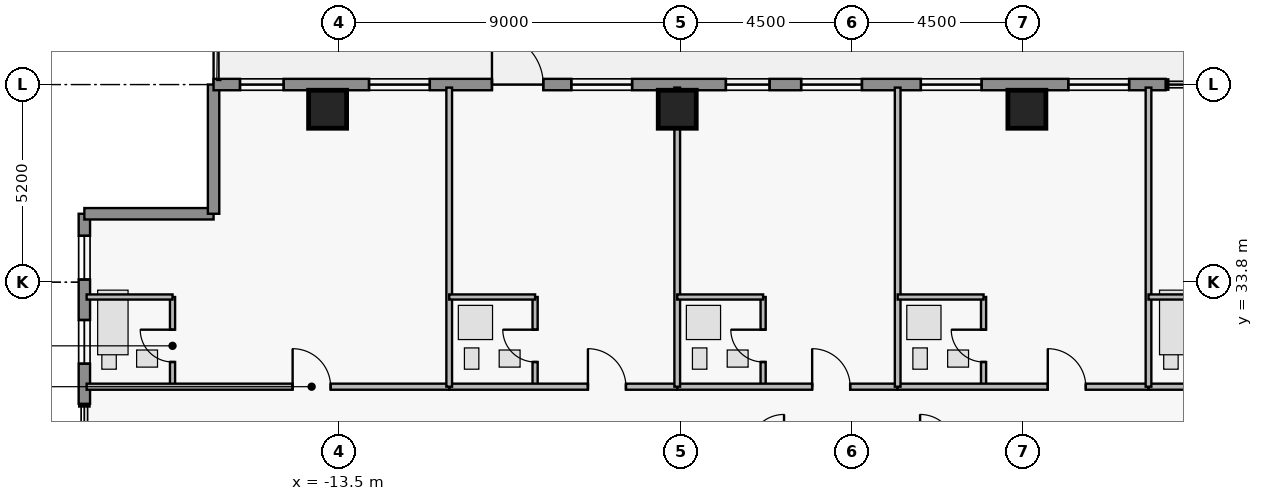
"""IFC4 building model, lengths in metres.
Left out: names, types, materials, properties, quantities, classifications, styles, units other than length and angle.
Written with IfcOpenShell. Run it as: python <this file> out.ifc"""

import sys

from ifc_helpers import new_model, si_unit, direction, frame, frame_2d, origin, origin_2d, place, context, subcontext, project, spatial, rectangle, extrude, element, fill, save


model = new_model("IFC4")
c1 = context("Model", 3, precision=1e-05, world=origin(), true_north=direction((0.0, 1.0)))
c2 = subcontext(c1, "Body", "Model", "MODEL_VIEW")
j1 = project(units=[si_unit("LENGTHUNIT", "METRE"), si_unit("PLANEANGLEUNIT", "RADIAN")], contexts=[c1])
p1 = place(None, origin())
s1 = spatial("IfcSite", under=j1, at=p1, CompositionType="ELEMENT")
p2 = place(p1, origin())
s2 = spatial("IfcBuilding", under=s1, at=p2, CompositionType="ELEMENT")
p3 = place(p2, frame((0.0, 0.0, 243.35)))
s3 = spatial("IfcBuildingStorey", under=s2, at=p3, CompositionType="ELEMENT", Elevation=243.35)
for number, where, z_axis, x_axis in (
    (1, (-13.8, 38.35, 0.0), (0.0, 0.0, 1.0), (1.0, 0.0, 0.0)),
    (2, (-4.6, 38.35, 0.0), (0.0, 0.0, 1.0), (1.0, 0.0, 0.0)),
    (3, (4.6, 38.35, 0.0), (0.0, 0.0, 1.0), (1.0, 0.0, 0.0)),
):
    element("IfcColumn", number, at=place(p3, frame(where, z_axis=z_axis, x_axis=x_axis)), inside=s3, PredefinedType="COLUMN", context=c2, shape_type="SweptSolid", body=[
        extrude(rectangle(XDim=1.0, YDim=1.0, at=origin_2d()), origin(), (0.0, 0.0, 1.0), 3.7),
    ])
p4 = place(p3, frame((-20.2, 30.6, 0.0), z_axis=(0.0, 0.0, 1.0), x_axis=(0.0, 1.0, 0.0)))
e4 = element("IfcWall", 4, at=p4, inside=s3, PredefinedType="STANDARD", context=c2, shape_type="SweptSolid", body=[
    extrude(rectangle(XDim=5.0, YDim=0.3, at=frame_2d((2.5, 0.0))), origin(), (0.0, 0.0, 1.0), 3.48),
])
p5 = place(p4, frame((1.055, 0.0, 0.95)))
e5 = element("IfcOpeningElement", 5, at=p5, cuts=e4, PredefinedType="OPENING", context=c2, shape_type="SweptSolid", body=[
    extrude(rectangle(XDim=1.15, YDim=1.55, at=frame_2d((0.575, 0.775))), frame((0.0, 0.16, 0.0), z_axis=(0.0, -1.0, 0.0), x_axis=(1.0, 0.0, 0.0)), (0.0, 0.0, 1.0), 0.32),
])
p6 = place(p4, frame((3.27, 0.0, 0.95)))
e6 = element("IfcOpeningElement", 6, at=p6, cuts=e4, PredefinedType="OPENING", context=c2, shape_type="SweptSolid", body=[
    extrude(rectangle(XDim=1.15, YDim=1.55, at=frame_2d((0.575, 0.775))), frame((0.0, 0.16, 0.0), z_axis=(0.0, -1.0, 0.0), x_axis=(1.0, 0.0, 0.0)), (0.0, 0.0, 1.0), 0.32),
])
for number, where, z_axis, x_axis in (
    (7, (-20.2, 35.6, 0.0), (0.0, 0.0, 1.0), (1.0, 0.0, 0.0)),
    (8, (-16.8, 35.6, 0.0), (0.0, 0.0, 1.0), (0.0, 1.0, 0.0)),
):
    element("IfcWall", number, at=place(p3, frame(where, z_axis=z_axis, x_axis=x_axis)), inside=s3, PredefinedType="STANDARD", context=c2, shape_type="SweptSolid", body=[
        extrude(rectangle(XDim=3.4, YDim=0.3, at=frame_2d((1.7, 0.0))), origin(), (0.0, 0.0, 1.0), 3.48),
    ])
p7 = place(p3, frame((-16.8, 39.0, 0.0), z_axis=(0.0, 0.0, 1.0), x_axis=(1.0, 0.0, 0.0)))
e9 = element("IfcWall", 9, at=p7, inside=s3, PredefinedType="STANDARD", context=c2, shape_type="SweptSolid", body=[
    extrude(rectangle(XDim=25.05, YDim=0.3, at=frame_2d((12.525, 0.0))), origin(), (0.0, 0.0, 1.0), 3.48),
])
p8 = place(p7, frame((7.325, 0.0, 0.0)))
e10 = element("IfcOpeningElement", 10, at=p8, cuts=e9, PredefinedType="OPENING", context=c2, shape_type="SweptSolid", body=[
    extrude(rectangle(XDim=1.35, YDim=2.3, at=frame_2d((0.675, 1.15))), frame((0.0, 0.16, 0.0), z_axis=(0.0, -1.0, 0.0), x_axis=(1.0, 0.0, 0.0)), (0.0, 0.0, 1.0), 0.32),
])
p9 = place(p7, frame((15.46, 0.0, 0.85)))
e11 = element("IfcOpeningElement", 11, at=p9, cuts=e9, PredefinedType="OPENING", context=c2, shape_type="SweptSolid", body=[
    extrude(rectangle(XDim=1.6, YDim=1.8, at=frame_2d((0.8, 0.9))), frame((0.0, 0.16, 0.0), z_axis=(0.0, -1.0, 0.0), x_axis=(1.0, 0.0, 0.0)), (0.0, 0.0, 1.0), 0.32),
])
p10 = place(p7, frame((0.695, 0.0, 0.95)))
e12 = element("IfcOpeningElement", 12, at=p10, cuts=e9, PredefinedType="OPENING", context=c2, shape_type="SweptSolid", body=[
    extrude(rectangle(XDim=1.15, YDim=1.55, at=frame_2d((0.575, 0.775))), frame((0.0, 0.16, 0.0), z_axis=(0.0, -1.0, 0.0), x_axis=(1.0, 0.0, 0.0)), (0.0, 0.0, 1.0), 0.32),
])
p11 = place(p7, frame((4.09, 0.0, 0.85)))
e13 = element("IfcOpeningElement", 13, at=p11, cuts=e9, PredefinedType="OPENING", context=c2, shape_type="SweptSolid", body=[
    extrude(rectangle(XDim=1.6, YDim=1.8, at=frame_2d((0.8, 0.9))), frame((0.0, 0.16, 0.0), z_axis=(0.0, -1.0, 0.0), x_axis=(1.0, 0.0, 0.0)), (0.0, 0.0, 1.0), 0.32),
])
p12 = place(p7, frame((9.413, 0.0, 0.85)))
e14 = element("IfcOpeningElement", 14, at=p12, cuts=e9, PredefinedType="OPENING", context=c2, shape_type="SweptSolid", body=[
    extrude(rectangle(XDim=1.6, YDim=1.8, at=frame_2d((0.8, 0.9))), frame((0.0, 0.16, 0.0), z_axis=(0.0, -1.0, 0.0), x_axis=(1.0, 0.0, 0.0)), (0.0, 0.0, 1.0), 0.32),
])
p13 = place(p7, frame((13.48, 0.0, 0.95)))
e15 = element("IfcOpeningElement", 15, at=p13, cuts=e9, PredefinedType="OPENING", context=c2, shape_type="SweptSolid", body=[
    extrude(rectangle(XDim=1.15, YDim=1.55, at=frame_2d((0.575, 0.775))), frame((0.0, 0.16, 0.0), z_axis=(0.0, -1.0, 0.0), x_axis=(1.0, 0.0, 0.0)), (0.0, 0.0, 1.0), 0.32),
])
p14 = place(p7, frame((18.61, 0.0, 0.85)))
e16 = element("IfcOpeningElement", 16, at=p14, cuts=e9, PredefinedType="OPENING", context=c2, shape_type="SweptSolid", body=[
    extrude(rectangle(XDim=1.6, YDim=1.8, at=frame_2d((0.8, 0.9))), frame((0.0, 0.16, 0.0), z_axis=(0.0, -1.0, 0.0), x_axis=(1.0, 0.0, 0.0)), (0.0, 0.0, 1.0), 0.32),
])
p15 = place(p7, frame((22.49, 0.0, 0.85)))
e17 = element("IfcOpeningElement", 17, at=p15, cuts=e9, PredefinedType="OPENING", context=c2, shape_type="SweptSolid", body=[
    extrude(rectangle(XDim=1.6, YDim=1.8, at=frame_2d((0.8, 0.9))), frame((0.0, 0.16, 0.0), z_axis=(0.0, -1.0, 0.0), x_axis=(1.0, 0.0, 0.0)), (0.0, 0.0, 1.0), 0.32),
])
p16 = place(p3, frame((-17.88, 31.05, 0.0), z_axis=(0.0, 0.0, 1.0), x_axis=(0.0, 1.0, 0.0)))
e18 = element("IfcWall", 18, at=p16, inside=s3, PredefinedType="PLUMBINGWALL", context=c2, shape_type="SweptSolid", body=[
    extrude(rectangle(XDim=2.36, YDim=0.135, at=frame_2d((1.18, 0.0))), origin(), (0.0, 0.0, 1.0), 3.48),
])
p17 = place(p16, frame((0.65, 0.0, 0.0)))
e19 = element("IfcOpeningElement", 19, at=p17, cuts=e18, PredefinedType="OPENING", context=c2, shape_type="SweptSolid", body=[
    extrude(rectangle(XDim=0.85, YDim=2.1, at=frame_2d((0.425, 1.05))), frame((0.0, 0.077, 0.0), z_axis=(0.0, -1.0, 0.0), x_axis=(1.0, 0.0, 0.0)), (0.0, 0.0, 1.0), 0.155),
])
p18 = place(p3, frame((-20.14, 31.05, 0.0), z_axis=(0.0, 0.0, 1.0), x_axis=(1.0, 0.0, 0.0)))
e20 = element("IfcWall", 20, at=p18, inside=s3, PredefinedType="PARTITIONING", context=c2, shape_type="SweptSolid", body=[
    extrude(rectangle(XDim=9.54, YDim=0.16, at=frame_2d((4.77, 0.0))), origin(), (0.0, 0.0, 1.0), 3.48),
])
p19 = place(p18, frame((5.42, 0.0, 0.0)))
e21 = element("IfcOpeningElement", 21, at=p19, cuts=e20, PredefinedType="OPENING", context=c2, shape_type="SweptSolid", body=[
    extrude(rectangle(XDim=1.0, YDim=2.15, at=frame_2d((0.5, 1.075))), frame((0.0, 0.09, 0.0), z_axis=(0.0, -1.0, 0.0), x_axis=(1.0, 0.0, 0.0)), (0.0, 0.0, 1.0), 0.18),
])
p20 = place(p3, frame((-8.34, 31.05, 0.0), z_axis=(0.0, 0.0, 1.0), x_axis=(0.0, 1.0, 0.0)))
e22 = element("IfcWall", 22, at=p20, inside=s3, PredefinedType="PLUMBINGWALL", context=c2, shape_type="SweptSolid", body=[
    extrude(rectangle(XDim=2.36, YDim=0.135, at=frame_2d((1.18, 0.0))), origin(), (0.0, 0.0, 1.0), 3.48),
])
p21 = place(p20, frame((0.65, 0.0, 0.0)))
e23 = element("IfcOpeningElement", 23, at=p21, cuts=e22, PredefinedType="OPENING", context=c2, shape_type="SweptSolid", body=[
    extrude(rectangle(XDim=0.85, YDim=2.1, at=frame_2d((0.425, 1.05))), frame((0.0, 0.077, 0.0), z_axis=(0.0, -1.0, 0.0), x_axis=(1.0, 0.0, 0.0)), (0.0, 0.0, 1.0), 0.155),
])
p22 = place(p3, frame((-10.6, 31.05, 0.0), z_axis=(0.0, 0.0, 1.0), x_axis=(1.0, 0.0, 0.0)))
e24 = element("IfcWall", 24, at=p22, inside=s3, PredefinedType="PARTITIONING", context=c2, shape_type="SweptSolid", body=[
    extrude(rectangle(XDim=6.0, YDim=0.16, at=frame_2d((3.0, 0.0))), origin(), (0.0, 0.0, 1.0), 3.48),
])
p23 = place(p22, frame((3.65, 0.0, 0.0)))
e25 = element("IfcOpeningElement", 25, at=p23, cuts=e24, PredefinedType="OPENING", context=c2, shape_type="SweptSolid", body=[
    extrude(rectangle(XDim=1.0, YDim=2.15, at=frame_2d((0.5, 1.075))), frame((0.0, 0.09, 0.0), z_axis=(0.0, -1.0, 0.0), x_axis=(1.0, 0.0, 0.0)), (0.0, 0.0, 1.0), 0.18),
])
p24 = place(p3, frame((-2.34, 31.05, 0.0), z_axis=(0.0, 0.0, 1.0), x_axis=(0.0, 1.0, 0.0)))
e26 = element("IfcWall", 26, at=p24, inside=s3, PredefinedType="PLUMBINGWALL", context=c2, shape_type="SweptSolid", body=[
    extrude(rectangle(XDim=2.36, YDim=0.135, at=frame_2d((1.18, 0.0))), origin(), (0.0, 0.0, 1.0), 3.48),
])
p25 = place(p24, frame((0.65, 0.0, 0.0)))
e27 = element("IfcOpeningElement", 27, at=p25, cuts=e26, PredefinedType="OPENING", context=c2, shape_type="SweptSolid", body=[
    extrude(rectangle(XDim=0.85, YDim=2.1, at=frame_2d((0.425, 1.05))), frame((0.0, 0.077, 0.0), z_axis=(0.0, -1.0, 0.0), x_axis=(1.0, 0.0, 0.0)), (0.0, 0.0, 1.0), 0.155),
])
p26 = place(p3, frame((-4.6, 31.05, 0.0), z_axis=(0.0, 0.0, 1.0), x_axis=(1.0, 0.0, 0.0)))
e28 = element("IfcWall", 28, at=p26, inside=s3, PredefinedType="PARTITIONING", context=c2, shape_type="SweptSolid", body=[
    extrude(rectangle(XDim=5.8, YDim=0.16, at=frame_2d((2.9, 0.0))), origin(), (0.0, 0.0, 1.0), 3.48),
])
p27 = place(p26, frame((3.55, 0.0, 0.0)))
e29 = element("IfcOpeningElement", 29, at=p27, cuts=e28, PredefinedType="OPENING", context=c2, shape_type="SweptSolid", body=[
    extrude(rectangle(XDim=1.0, YDim=2.15, at=frame_2d((0.5, 1.075))), frame((0.0, 0.09, 0.0), z_axis=(0.0, -1.0, 0.0), x_axis=(1.0, 0.0, 0.0)), (0.0, 0.0, 1.0), 0.18),
])
p28 = place(p3, frame((3.46, 31.05, 0.0), z_axis=(0.0, 0.0, 1.0), x_axis=(0.0, 1.0, 0.0)))
e30 = element("IfcWall", 30, at=p28, inside=s3, PredefinedType="PLUMBINGWALL", context=c2, shape_type="SweptSolid", body=[
    extrude(rectangle(XDim=2.36, YDim=0.135, at=frame_2d((1.18, 0.0))), origin(), (0.0, 0.0, 1.0), 3.48),
])
p29 = place(p28, frame((0.65, 0.0, 0.0)))
e31 = element("IfcOpeningElement", 31, at=p29, cuts=e30, PredefinedType="OPENING", context=c2, shape_type="SweptSolid", body=[
    extrude(rectangle(XDim=0.85, YDim=2.1, at=frame_2d((0.425, 1.05))), frame((0.0, 0.077, 0.0), z_axis=(0.0, -1.0, 0.0), x_axis=(1.0, 0.0, 0.0)), (0.0, 0.0, 1.0), 0.155),
])
p30 = place(p3, frame((1.2, 31.05, 0.0), z_axis=(0.0, 0.0, 1.0), x_axis=(1.0, 0.0, 0.0)))
e32 = element("IfcWall", 32, at=p30, inside=s3, PredefinedType="PARTITIONING", context=c2, shape_type="SweptSolid", body=[
    extrude(rectangle(XDim=6.6, YDim=0.16, at=frame_2d((3.3, 0.0))), origin(), (0.0, 0.0, 1.0), 3.48),
])
p31 = place(p30, frame((3.95, 0.0, 0.0)))
e33 = element("IfcOpeningElement", 33, at=p31, cuts=e32, PredefinedType="OPENING", context=c2, shape_type="SweptSolid", body=[
    extrude(rectangle(XDim=1.0, YDim=2.15, at=frame_2d((0.5, 1.075))), frame((0.0, 0.09, 0.0), z_axis=(0.0, -1.0, 0.0), x_axis=(1.0, 0.0, 0.0)), (0.0, 0.0, 1.0), 0.18),
])
p32 = place(p3, frame((7.8, 31.05, 0.0), z_axis=(0.0, 0.0, 1.0), x_axis=(1.0, 0.0, 0.0)))
e34 = element("IfcWall", 34, at=p32, inside=s3, PredefinedType="PARTITIONING", context=c2, shape_type="SweptSolid", body=[
    extrude(rectangle(XDim=12.34, YDim=0.16, at=frame_2d((6.17, 0.0))), origin(), (0.0, 0.0, 1.0), 3.48),
])
p33 = place(p32, frame((6.82, 0.0, 0.0)))
e35 = element("IfcOpeningElement", 35, at=p33, cuts=e34, PredefinedType="OPENING", context=c2, shape_type="SweptSolid", body=[
    extrude(rectangle(XDim=1.0, YDim=2.15, at=frame_2d((0.5, 1.075))), frame((0.0, 0.09, 0.0), z_axis=(0.0, -1.0, 0.0), x_axis=(1.0, 0.0, 0.0)), (0.0, 0.0, 1.0), 0.18),
])
p34 = place(p3, frame((-20.14, 33.41, 0.0), z_axis=(0.0, 0.0, 1.0), x_axis=(1.0, 0.0, 0.0)))
e36 = element("IfcWall", 36, at=p34, inside=s3, PredefinedType="PLUMBINGWALL", context=c2, shape_type="SweptSolid", body=[
    extrude(rectangle(XDim=2.26, YDim=0.135, at=frame_2d((1.13, 0.0))), origin(), (0.0, 0.0, 1.0), 3.48),
])
p35 = place(p3, frame((-10.6, 31.05, 0.0), z_axis=(0.0, 0.0, 1.0), x_axis=(0.0, 1.0, 0.0)))
e37 = element("IfcWall", 37, at=p35, inside=s3, PredefinedType="PARTITIONING", context=c2, shape_type="SweptSolid", body=[
    extrude(rectangle(XDim=7.87, YDim=0.15, at=frame_2d((3.935, 0.0))), origin(), (0.0, 0.0, 1.0), 3.48),
])
p36 = place(p3, frame((-10.6, 33.41, 0.0), z_axis=(0.0, 0.0, 1.0), x_axis=(1.0, 0.0, 0.0)))
e38 = element("IfcWall", 38, at=p36, inside=s3, PredefinedType="PLUMBINGWALL", context=c2, shape_type="SweptSolid", body=[
    extrude(rectangle(XDim=2.26, YDim=0.135, at=frame_2d((1.13, 0.0))), origin(), (0.0, 0.0, 1.0), 3.076),
])
p37 = place(p3, frame((-4.6, 31.05, 0.0), z_axis=(0.0, 0.0, 1.0), x_axis=(0.0, 1.0, 0.0)))
e39 = element("IfcWall", 39, at=p37, inside=s3, PredefinedType="PARTITIONING", context=c2, shape_type="SweptSolid", body=[
    extrude(rectangle(XDim=7.87, YDim=0.15, at=frame_2d((3.935, 0.0))), origin(), (0.0, 0.0, 1.0), 2.362),
])
p38 = place(p3, frame((-4.6, 33.41, 0.0), z_axis=(0.0, 0.0, 1.0), x_axis=(1.0, 0.0, 0.0)))
e40 = element("IfcWall", 40, at=p38, inside=s3, PredefinedType="PLUMBINGWALL", context=c2, shape_type="SweptSolid", body=[
    extrude(rectangle(XDim=2.26, YDim=0.135, at=frame_2d((1.13, 0.0))), origin(), (0.0, 0.0, 1.0), 3.076),
])
p39 = place(p3, frame((1.2, 31.05, 0.0), z_axis=(0.0, 0.0, 1.0), x_axis=(0.0, 1.0, 0.0)))
e41 = element("IfcWall", 41, at=p39, inside=s3, PredefinedType="PARTITIONING", context=c2, shape_type="SweptSolid", body=[
    extrude(rectangle(XDim=7.87, YDim=0.15, at=frame_2d((3.935, 0.0))), origin(), (0.0, 0.0, 1.0), 3.48),
])
p40 = place(p3, frame((1.2, 33.41, 0.0), z_axis=(0.0, 0.0, 1.0), x_axis=(1.0, 0.0, 0.0)))
e42 = element("IfcWall", 42, at=p40, inside=s3, PredefinedType="PLUMBINGWALL", context=c2, shape_type="SweptSolid", body=[
    extrude(rectangle(XDim=2.26, YDim=0.135, at=frame_2d((1.13, 0.0))), origin(), (0.0, 0.0, 1.0), 3.076),
])
p41 = place(p3, frame((7.8, 31.05, 0.0), z_axis=(0.0, 0.0, 1.0), x_axis=(0.0, 1.0, 0.0)))
e43 = element("IfcWall", 43, at=p41, inside=s3, PredefinedType="PARTITIONING", context=c2, shape_type="SweptSolid", body=[
    extrude(rectangle(XDim=7.87, YDim=0.15, at=frame_2d((3.935, 0.0))), origin(), (0.0, 0.0, 1.0), 3.48),
])
p42 = place(p3, frame((7.8, 33.41, 0.0), z_axis=(0.0, 0.0, 1.0), x_axis=(1.0, 0.0, 0.0)))
e44 = element("IfcWall", 44, at=p42, inside=s3, PredefinedType="PLUMBINGWALL", context=c2, shape_type="SweptSolid", body=[
    extrude(rectangle(XDim=2.26, YDim=0.135, at=frame_2d((1.13, 0.0))), origin(), (0.0, 0.0, 1.0), 3.076),
])
p43 = place(p5, origin())
e45 = element("IfcWindow", 45, at=p43, inside=s3, PartitioningType="SINGLE_PANEL", PredefinedType="WINDOW", context=c2, shape_type="SweptSolid", body=[
    extrude(rectangle(XDim=1.15, YDim=1.55, at=frame_2d((0.575, 0.775))), frame((0.0, 0.03, 0.0), z_axis=(0.0, -1.0, 0.0), x_axis=(1.0, 0.0, 0.0)), (0.0, 0.0, 1.0), 0.06),
])
fill(e5, e45)
p44 = place(p6, origin())
e46 = element("IfcWindow", 46, at=p44, inside=s3, PartitioningType="SINGLE_PANEL", PredefinedType="WINDOW", context=c2, shape_type="SweptSolid", body=[
    extrude(rectangle(XDim=1.15, YDim=1.55, at=frame_2d((0.575, 0.775))), frame((0.0, 0.03, 0.0), z_axis=(0.0, -1.0, 0.0), x_axis=(1.0, 0.0, 0.0)), (0.0, 0.0, 1.0), 0.06),
])
fill(e6, e46)
p45 = place(p8, origin())
e47 = element("IfcDoor", 47, at=p45, inside=s3, OperationType="SINGLE_SWING_LEFT", PredefinedType="DOOR", context=c2, shape_type="SweptSolid", body=[
    extrude(rectangle(XDim=1.35, YDim=2.3, at=frame_2d((0.675, 1.15))), frame((0.0, 0.025, 0.0), z_axis=(0.0, -1.0, 0.0), x_axis=(1.0, 0.0, 0.0)), (0.0, 0.0, 1.0), 0.05),
])
fill(e10, e47)
p46 = place(p9, origin())
e48 = element("IfcWindow", 48, at=p46, inside=s3, PartitioningType="SINGLE_PANEL", PredefinedType="WINDOW", context=c2, shape_type="SweptSolid", body=[
    extrude(rectangle(XDim=1.6, YDim=1.8, at=frame_2d((0.8, 0.9))), frame((0.0, 0.03, 0.0), z_axis=(0.0, -1.0, 0.0), x_axis=(1.0, 0.0, 0.0)), (0.0, 0.0, 1.0), 0.06),
])
fill(e11, e48)
p47 = place(p10, origin())
e49 = element("IfcWindow", 49, at=p47, inside=s3, PartitioningType="SINGLE_PANEL", PredefinedType="WINDOW", context=c2, shape_type="SweptSolid", body=[
    extrude(rectangle(XDim=1.15, YDim=1.55, at=frame_2d((0.575, 0.775))), frame((0.0, 0.03, 0.0), z_axis=(0.0, -1.0, 0.0), x_axis=(1.0, 0.0, 0.0)), (0.0, 0.0, 1.0), 0.06),
])
fill(e12, e49)
p48 = place(p11, origin())
e50 = element("IfcWindow", 50, at=p48, inside=s3, PartitioningType="SINGLE_PANEL", PredefinedType="WINDOW", context=c2, shape_type="SweptSolid", body=[
    extrude(rectangle(XDim=1.6, YDim=1.8, at=frame_2d((0.8, 0.9))), frame((0.0, 0.03, 0.0), z_axis=(0.0, -1.0, 0.0), x_axis=(1.0, 0.0, 0.0)), (0.0, 0.0, 1.0), 0.06),
])
fill(e13, e50)
p49 = place(p12, origin())
e51 = element("IfcWindow", 51, at=p49, inside=s3, PartitioningType="SINGLE_PANEL", PredefinedType="WINDOW", context=c2, shape_type="SweptSolid", body=[
    extrude(rectangle(XDim=1.6, YDim=1.8, at=frame_2d((0.8, 0.9))), frame((0.0, 0.03, 0.0), z_axis=(0.0, -1.0, 0.0), x_axis=(1.0, 0.0, 0.0)), (0.0, 0.0, 1.0), 0.06),
])
fill(e14, e51)
p50 = place(p13, origin())
e52 = element("IfcWindow", 52, at=p50, inside=s3, PartitioningType="SINGLE_PANEL", PredefinedType="WINDOW", context=c2, shape_type="SweptSolid", body=[
    extrude(rectangle(XDim=1.15, YDim=1.55, at=frame_2d((0.575, 0.775))), frame((0.0, 0.03, 0.0), z_axis=(0.0, -1.0, 0.0), x_axis=(1.0, 0.0, 0.0)), (0.0, 0.0, 1.0), 0.06),
])
fill(e15, e52)
p51 = place(p14, origin())
e53 = element("IfcWindow", 53, at=p51, inside=s3, PartitioningType="SINGLE_PANEL", PredefinedType="WINDOW", context=c2, shape_type="SweptSolid", body=[
    extrude(rectangle(XDim=1.6, YDim=1.8, at=frame_2d((0.8, 0.9))), frame((0.0, 0.03, 0.0), z_axis=(0.0, -1.0, 0.0), x_axis=(1.0, 0.0, 0.0)), (0.0, 0.0, 1.0), 0.06),
])
fill(e16, e53)
p52 = place(p15, origin())
e54 = element("IfcWindow", 54, at=p52, inside=s3, PartitioningType="SINGLE_PANEL", PredefinedType="WINDOW", context=c2, shape_type="SweptSolid", body=[
    extrude(rectangle(XDim=1.6, YDim=1.8, at=frame_2d((0.8, 0.9))), frame((0.0, 0.03, 0.0), z_axis=(0.0, -1.0, 0.0), x_axis=(1.0, 0.0, 0.0)), (0.0, 0.0, 1.0), 0.06),
])
fill(e17, e54)
p53 = place(p17, origin())
e55 = element("IfcDoor", 55, at=p53, inside=s3, OperationType="SINGLE_SWING_RIGHT", PredefinedType="DOOR", context=c2, shape_type="SweptSolid", body=[
    extrude(rectangle(XDim=0.85, YDim=2.1, at=frame_2d((0.425, 1.05))), frame((0.0, 0.025, 0.0), z_axis=(0.0, -1.0, 0.0), x_axis=(1.0, 0.0, 0.0)), (0.0, 0.0, 1.0), 0.05),
])
fill(e19, e55)
p54 = place(p19, origin())
e56 = element("IfcDoor", 56, at=p54, inside=s3, OperationType="SINGLE_SWING_LEFT", PredefinedType="DOOR", context=c2, shape_type="SweptSolid", body=[
    extrude(rectangle(XDim=1.0, YDim=2.15, at=frame_2d((0.5, 1.075))), frame((0.0, 0.025, 0.0), z_axis=(0.0, -1.0, 0.0), x_axis=(1.0, 0.0, 0.0)), (0.0, 0.0, 1.0), 0.05),
])
fill(e21, e56)
p55 = place(p21, origin())
e57 = element("IfcDoor", 57, at=p55, inside=s3, OperationType="SINGLE_SWING_RIGHT", PredefinedType="DOOR", context=c2, shape_type="SweptSolid", body=[
    extrude(rectangle(XDim=0.85, YDim=2.1, at=frame_2d((0.425, 1.05))), frame((0.0, 0.025, 0.0), z_axis=(0.0, -1.0, 0.0), x_axis=(1.0, 0.0, 0.0)), (0.0, 0.0, 1.0), 0.05),
])
fill(e23, e57)
p56 = place(p23, origin())
e58 = element("IfcDoor", 58, at=p56, inside=s3, OperationType="SINGLE_SWING_LEFT", PredefinedType="DOOR", context=c2, shape_type="SweptSolid", body=[
    extrude(rectangle(XDim=1.0, YDim=2.15, at=frame_2d((0.5, 1.075))), frame((0.0, 0.025, 0.0), z_axis=(0.0, -1.0, 0.0), x_axis=(1.0, 0.0, 0.0)), (0.0, 0.0, 1.0), 0.05),
])
fill(e25, e58)
p57 = place(p25, origin())
e59 = element("IfcDoor", 59, at=p57, inside=s3, OperationType="SINGLE_SWING_RIGHT", PredefinedType="DOOR", context=c2, shape_type="SweptSolid", body=[
    extrude(rectangle(XDim=0.85, YDim=2.1, at=frame_2d((0.425, 1.05))), frame((0.0, 0.025, 0.0), z_axis=(0.0, -1.0, 0.0), x_axis=(1.0, 0.0, 0.0)), (0.0, 0.0, 1.0), 0.05),
])
fill(e27, e59)
p58 = place(p27, origin())
e60 = element("IfcDoor", 60, at=p58, inside=s3, OperationType="SINGLE_SWING_LEFT", PredefinedType="DOOR", context=c2, shape_type="SweptSolid", body=[
    extrude(rectangle(XDim=1.0, YDim=2.15, at=frame_2d((0.5, 1.075))), frame((0.0, 0.025, 0.0), z_axis=(0.0, -1.0, 0.0), x_axis=(1.0, 0.0, 0.0)), (0.0, 0.0, 1.0), 0.05),
])
fill(e29, e60)
p59 = place(p29, origin())
e61 = element("IfcDoor", 61, at=p59, inside=s3, OperationType="SINGLE_SWING_RIGHT", PredefinedType="DOOR", context=c2, shape_type="SweptSolid", body=[
    extrude(rectangle(XDim=0.85, YDim=2.1, at=frame_2d((0.425, 1.05))), frame((0.0, 0.025, 0.0), z_axis=(0.0, -1.0, 0.0), x_axis=(1.0, 0.0, 0.0)), (0.0, 0.0, 1.0), 0.05),
])
fill(e31, e61)
p60 = place(p31, origin())
e62 = element("IfcDoor", 62, at=p60, inside=s3, OperationType="SINGLE_SWING_LEFT", PredefinedType="DOOR", context=c2, shape_type="SweptSolid", body=[
    extrude(rectangle(XDim=1.0, YDim=2.15, at=frame_2d((0.5, 1.075))), frame((0.0, 0.025, 0.0), z_axis=(0.0, -1.0, 0.0), x_axis=(1.0, 0.0, 0.0)), (0.0, 0.0, 1.0), 0.05),
])
fill(e33, e62)
save(model, sys.argv[1])
